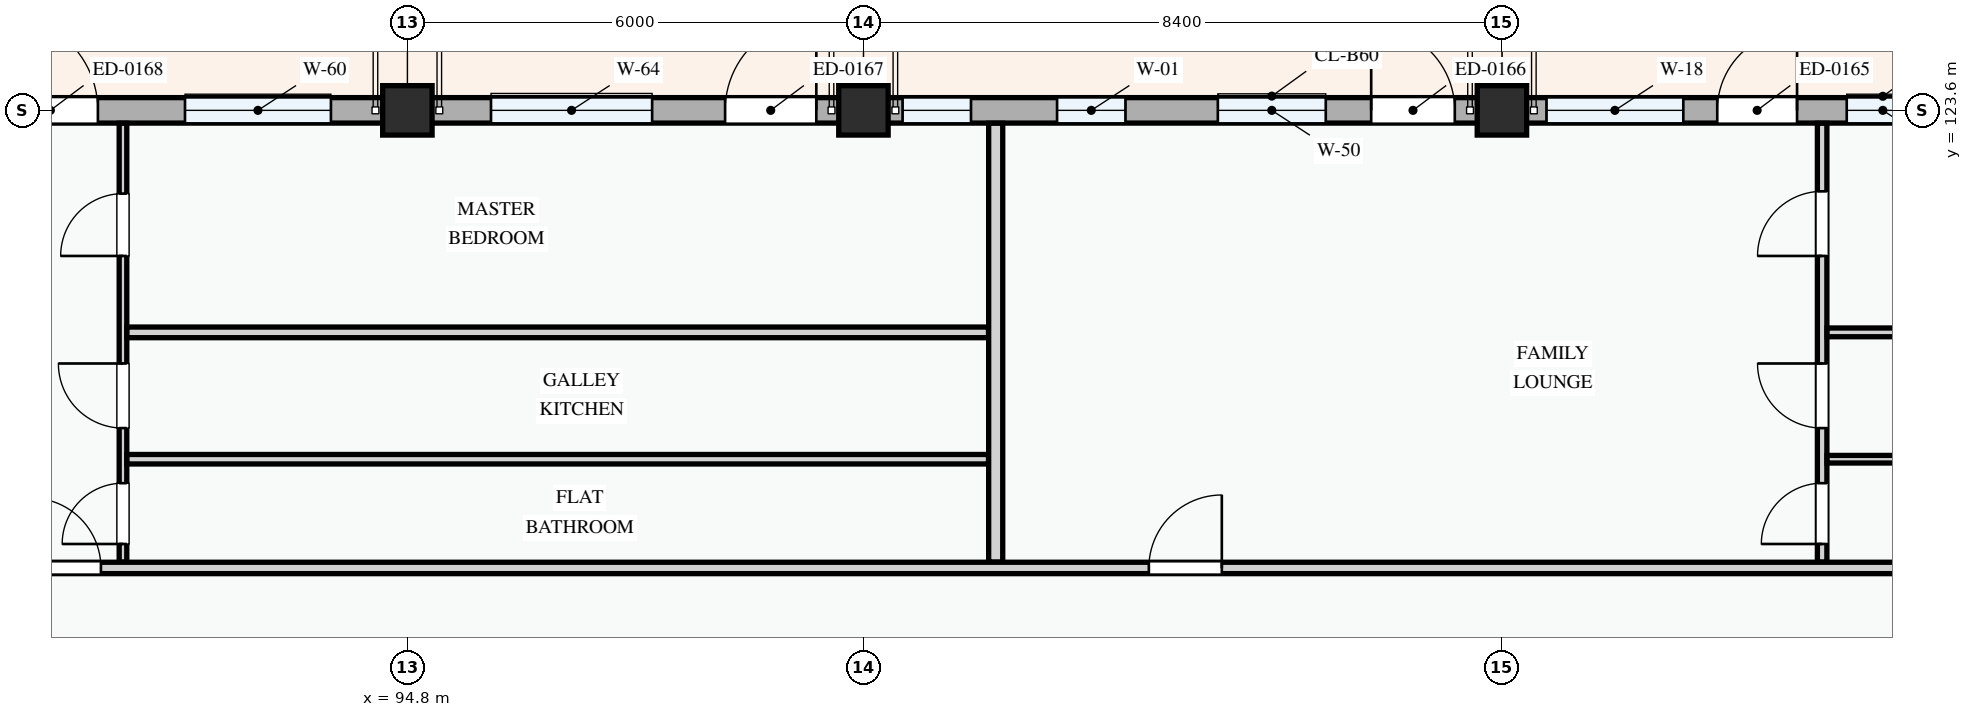
"""IFC4 building model, lengths in metres.
Left out: names, types, materials, properties, quantities, classifications, styles, units other than length and angle.
Written with IfcOpenShell. Run it as: python <this file> out.ifc"""

import sys

from ifc_helpers import new_model, si_unit, direction, frame, frame_2d, origin, origin_2d, place, context, subcontext, project, spatial, rectangle, extrude, element, fill, save


model = new_model("IFC4")
c1 = context("Model", 3, precision=1e-05, world=origin(), true_north=direction((0.0, 1.0)))
c2 = subcontext(c1, "Body", "Model", "MODEL_VIEW")
j1 = project(units=[si_unit("LENGTHUNIT", "METRE"), si_unit("PLANEANGLEUNIT", "RADIAN")], contexts=[c1])
p1 = place(None, origin())
s1 = spatial("IfcSite", under=j1, at=p1, CompositionType="ELEMENT")
p2 = place(p1, origin())
s2 = spatial("IfcBuilding", under=s1, at=p2, CompositionType="ELEMENT")
p3 = place(p2, frame((0.0, 0.0, 14.7)))
s3 = spatial("IfcBuildingStorey", under=s2, at=p3, CompositionType="ELEMENT", Elevation=14.7)
for number, where, z_axis, x_axis in (
    (1, (94.8, 123.6, 0.0), (0.0, 0.0, 1.0), (1.0, 0.0, 0.0)),
    (2, (100.8, 123.6, 0.0), (0.0, 0.0, 1.0), (1.0, 0.0, 0.0)),
    (3, (109.2, 123.6, 0.0), (0.0, 0.0, 1.0), (1.0, 0.0, 0.0)),
):
    element("IfcColumn", number, at=place(p3, frame(where, z_axis=z_axis, x_axis=x_axis)), inside=s3, PredefinedType="COLUMN", context=c2, shape_type="SweptSolid", body=[
        extrude(rectangle(XDim=0.65, YDim=0.65, at=origin_2d()), origin(), (0.0, 0.0, 1.0), 3.3),
    ])
p4 = place(p3, frame((115.2, 123.6, 0.0), z_axis=(0.0, 0.0, 1.0), x_axis=(-1.0, 0.0, 0.0)))
e4 = element("IfcWall", 4, at=p4, inside=s3, PredefinedType="STANDARD", context=c2, shape_type="SweptSolid", body=[
    extrude(rectangle(XDim=6.0, YDim=0.335, at=frame_2d((3.0, 0.0))), origin(), (0.0, 0.0, 1.0), 2.445),
])
p5 = place(p4, frame((2.117, 0.0, 0.0)))
e5 = element("IfcOpeningElement", 5, at=p5, cuts=e4, PredefinedType="OPENING", context=c2, shape_type="SweptSolid", body=[
    extrude(rectangle(XDim=1.05, YDim=2.15, at=frame_2d((0.525, 1.075))), frame((0.0, 0.177, 0.0), z_axis=(0.0, -1.0, 0.0), x_axis=(1.0, 0.0, 0.0)), (0.0, 0.0, 1.0), 0.355),
])
p6 = place(p4, frame((0.514, 0.0, 0.78)))
e6 = element("IfcOpeningElement", 6, at=p6, cuts=e4, PredefinedType="OPENING", context=c2, shape_type="SweptSolid", body=[
    extrude(rectangle(XDim=0.95, YDim=1.15, at=frame_2d((0.475, 0.575))), frame((0.0, 0.177, 0.0), z_axis=(0.0, -1.0, 0.0), x_axis=(1.0, 0.0, 0.0)), (0.0, 0.0, 1.0), 0.355),
])
p7 = place(p4, frame((3.614, 0.0, 0.78)))
e7 = element("IfcOpeningElement", 7, at=p7, cuts=e4, PredefinedType="OPENING", context=c2, shape_type="SweptSolid", body=[
    extrude(rectangle(XDim=1.8, YDim=1.5, at=frame_2d((0.9, 0.75))), frame((0.0, 0.177, 0.0), z_axis=(0.0, -1.0, 0.0), x_axis=(1.0, 0.0, 0.0)), (0.0, 0.0, 1.0), 0.355),
])
p8 = place(p3, frame((109.2, 123.6, 0.0), z_axis=(0.0, 0.0, 1.0), x_axis=(-1.0, 0.0, 0.0)))
e8 = element("IfcWall", 8, at=p8, inside=s3, PredefinedType="STANDARD", context=c2, shape_type="SweptSolid", body=[
    extrude(rectangle(XDim=8.4, YDim=0.335, at=frame_2d((4.2, 0.0))), origin(), (0.0, 0.0, 1.0), 2.345),
])
p9 = place(p8, frame((0.62, 0.0, 0.0)))
e9 = element("IfcOpeningElement", 9, at=p9, cuts=e8, PredefinedType="OPENING", context=c2, shape_type="SweptSolid", body=[
    extrude(rectangle(XDim=1.1, YDim=2.15, at=frame_2d((0.55, 1.075))), frame((0.0, 0.177, 0.0), z_axis=(0.0, -1.0, 0.0), x_axis=(1.0, 0.0, 0.0)), (0.0, 0.0, 1.0), 0.355),
])
p10 = place(p8, frame((2.317, 0.0, 0.78)))
e10 = element("IfcOpeningElement", 10, at=p10, cuts=e8, PredefinedType="OPENING", context=c2, shape_type="SweptSolid", body=[
    extrude(rectangle(XDim=1.42, YDim=1.38, at=frame_2d((0.71, 0.69))), frame((0.0, 0.177, 0.0), z_axis=(0.0, -1.0, 0.0), x_axis=(1.0, 0.0, 0.0)), (0.0, 0.0, 1.0), 0.355),
])
p11 = place(p8, frame((4.952, 0.0, 0.78)))
e11 = element("IfcOpeningElement", 11, at=p11, cuts=e8, PredefinedType="OPENING", context=c2, shape_type="SweptSolid", body=[
    extrude(rectangle(XDim=0.9, YDim=1.2, at=frame_2d((0.45, 0.6))), frame((0.0, 0.177, 0.0), z_axis=(0.0, -1.0, 0.0), x_axis=(1.0, 0.0, 0.0)), (0.0, 0.0, 1.0), 0.355),
])
p12 = place(p8, frame((6.985, 0.0, 0.78)))
e12 = element("IfcOpeningElement", 12, at=p12, cuts=e8, PredefinedType="OPENING", context=c2, shape_type="SweptSolid", body=[
    extrude(rectangle(XDim=0.9, YDim=1.2, at=frame_2d((0.45, 0.6))), frame((0.0, 0.177, 0.0), z_axis=(0.0, -1.0, 0.0), x_axis=(1.0, 0.0, 0.0)), (0.0, 0.0, 1.0), 0.355),
])
p13 = place(p3, frame((100.8, 123.6, 0.0), z_axis=(0.0, 0.0, 1.0), x_axis=(-1.0, 0.0, 0.0)))
e13 = element("IfcWall", 13, at=p13, inside=s3, PredefinedType="STANDARD", context=c2, shape_type="SweptSolid", body=[
    extrude(rectangle(XDim=6.0, YDim=0.335, at=frame_2d((3.0, 0.0))), origin(), (0.0, 0.0, 1.0), 2.445),
])
p14 = place(p13, frame((0.62, 0.0, 0.0)))
e14 = element("IfcOpeningElement", 14, at=p14, cuts=e13, PredefinedType="OPENING", context=c2, shape_type="SweptSolid", body=[
    extrude(rectangle(XDim=1.2, YDim=2.15, at=frame_2d((0.6, 1.075))), frame((0.0, 0.177, 0.0), z_axis=(0.0, -1.0, 0.0), x_axis=(1.0, 0.0, 0.0)), (0.0, 0.0, 1.0), 0.355),
])
p15 = place(p13, frame((2.78, 0.0, 0.78)))
e15 = element("IfcOpeningElement", 15, at=p15, cuts=e13, PredefinedType="OPENING", context=c2, shape_type="SweptSolid", body=[
    extrude(rectangle(XDim=2.12, YDim=1.44, at=frame_2d((1.06, 0.72))), frame((0.0, 0.177, 0.0), z_axis=(0.0, -1.0, 0.0), x_axis=(1.0, 0.0, 0.0)), (0.0, 0.0, 1.0), 0.355),
])
p16 = place(p3, frame((94.8, 123.6, 0.0), z_axis=(0.0, 0.0, 1.0), x_axis=(-1.0, 0.0, 0.0)))
e16 = element("IfcWall", 16, at=p16, inside=s3, PredefinedType="STANDARD", context=c2, shape_type="SweptSolid", body=[
    extrude(rectangle(XDim=8.4, YDim=0.335, at=frame_2d((4.2, 0.0))), origin(), (0.0, 0.0, 1.0), 2.345),
])
p17 = place(p16, frame((4.072, 0.0, 0.0)))
e17 = element("IfcOpeningElement", 17, at=p17, cuts=e16, PredefinedType="OPENING", context=c2, shape_type="SweptSolid", body=[
    extrude(rectangle(XDim=1.25, YDim=2.2, at=frame_2d((0.625, 1.1))), frame((0.0, 0.177, 0.0), z_axis=(0.0, -1.0, 0.0), x_axis=(1.0, 0.0, 0.0)), (0.0, 0.0, 1.0), 0.355),
])
p18 = place(p16, frame((1.006, 0.0, 0.78)))
e18 = element("IfcOpeningElement", 18, at=p18, cuts=e16, PredefinedType="OPENING", context=c2, shape_type="SweptSolid", body=[
    extrude(rectangle(XDim=1.92, YDim=1.44, at=frame_2d((0.96, 0.72))), frame((0.0, 0.177, 0.0), z_axis=(0.0, -1.0, 0.0), x_axis=(1.0, 0.0, 0.0)), (0.0, 0.0, 1.0), 0.355),
])
p19 = place(p16, frame((6.166, 0.0, 0.78)))
e19 = element("IfcOpeningElement", 19, at=p19, cuts=e16, PredefinedType="OPENING", context=c2, shape_type="SweptSolid", body=[
    extrude(rectangle(XDim=1.25, YDim=1.45, at=frame_2d((0.625, 0.725))), frame((0.0, 0.177, 0.0), z_axis=(0.0, -1.0, 0.0), x_axis=(1.0, 0.0, 0.0)), (0.0, 0.0, 1.0), 0.355),
])
p20 = place(p3, frame((91.058, 117.657, 0.0), z_axis=(0.0, 0.0, 1.0), x_axis=(0.0, 1.0, 0.0)))
e20 = element("IfcWall", 20, at=p20, inside=s3, PredefinedType="PARTITIONING", context=c2, shape_type="SweptSolid", body=[
    extrude(rectangle(XDim=5.773, YDim=0.1, at=frame_2d((2.887, 0.0))), origin(), (0.0, 0.0, 1.0), 3.0),
])
p21 = place(p20, frame((0.238, 0.0, 0.0)))
e21 = element("IfcOpeningElement", 21, at=p21, cuts=e20, PredefinedType="OPENING", context=c2, shape_type="SweptSolid", body=[
    extrude(rectangle(XDim=0.8, YDim=2.1, at=frame_2d((0.4, 1.05))), frame((0.0, 0.06, 0.0), z_axis=(0.0, -1.0, 0.0), x_axis=(1.0, 0.0, 0.0)), (0.0, 0.0, 1.0), 0.12),
])
p22 = place(p20, frame((1.763, 0.0, 0.0)))
e22 = element("IfcOpeningElement", 22, at=p22, cuts=e20, PredefinedType="OPENING", context=c2, shape_type="SweptSolid", body=[
    extrude(rectangle(XDim=0.85, YDim=2.1, at=frame_2d((0.425, 1.05))), frame((0.0, 0.06, 0.0), z_axis=(0.0, -1.0, 0.0), x_axis=(1.0, 0.0, 0.0)), (0.0, 0.0, 1.0), 0.12),
])
p23 = place(p20, frame((4.028, 0.0, 0.0)))
e23 = element("IfcOpeningElement", 23, at=p23, cuts=e20, PredefinedType="OPENING", context=c2, shape_type="SweptSolid", body=[
    extrude(rectangle(XDim=0.82, YDim=2.08, at=frame_2d((0.41, 1.04))), frame((0.0, 0.06, 0.0), z_axis=(0.0, -1.0, 0.0), x_axis=(1.0, 0.0, 0.0)), (0.0, 0.0, 1.0), 0.12),
])
p24 = place(p3, frame((91.11, 120.679, 0.0), z_axis=(0.0, 0.0, 1.0), x_axis=(1.0, 0.0, 0.0)))
e24 = element("IfcWall", 24, at=p24, inside=s3, PredefinedType="PARTITIONING", context=c2, shape_type="SweptSolid", body=[
    extrude(rectangle(XDim=11.335, YDim=0.14, at=frame_2d((5.667, 0.0))), origin(), (0.0, 0.0, 1.0), 3.0),
])
p25 = place(p3, frame((91.11, 119.01, 0.0), z_axis=(0.0, 0.0, 1.0), x_axis=(1.0, 0.0, 0.0)))
e25 = element("IfcWall", 25, at=p25, inside=s3, PredefinedType="PARTITIONING", context=c2, shape_type="SweptSolid", body=[
    extrude(rectangle(XDim=11.335, YDim=0.125, at=frame_2d((5.667, 0.0))), origin(), (0.0, 0.0, 1.0), 3.0),
])
p26 = place(p3, frame((113.413, 117.657, 0.0), z_axis=(0.0, 0.0, 1.0), x_axis=(0.0, 1.0, 0.0)))
e26 = element("IfcWall", 26, at=p26, inside=s3, PredefinedType="PARTITIONING", context=c2, shape_type="SweptSolid", body=[
    extrude(rectangle(XDim=5.773, YDim=0.125, at=frame_2d((2.887, 0.0))), origin(), (0.0, 0.0, 1.0), 3.0),
])
p27 = place(p26, frame((0.238, 0.0, 0.0)))
e27 = element("IfcOpeningElement", 27, at=p27, cuts=e26, PredefinedType="OPENING", context=c2, shape_type="SweptSolid", body=[
    extrude(rectangle(XDim=0.8, YDim=2.1, at=frame_2d((0.4, 1.05))), frame((0.0, 0.073, 0.0), z_axis=(0.0, -1.0, 0.0), x_axis=(1.0, 0.0, 0.0)), (0.0, 0.0, 1.0), 0.145),
])
p28 = place(p26, frame((1.763, 0.0, 0.0)))
e28 = element("IfcOpeningElement", 28, at=p28, cuts=e26, PredefinedType="OPENING", context=c2, shape_type="SweptSolid", body=[
    extrude(rectangle(XDim=0.85, YDim=2.1, at=frame_2d((0.425, 1.05))), frame((0.0, 0.073, 0.0), z_axis=(0.0, -1.0, 0.0), x_axis=(1.0, 0.0, 0.0)), (0.0, 0.0, 1.0), 0.145),
])
p29 = place(p26, frame((4.028, 0.0, 0.0)))
e29 = element("IfcOpeningElement", 29, at=p29, cuts=e26, PredefinedType="OPENING", context=c2, shape_type="SweptSolid", body=[
    extrude(rectangle(XDim=0.85, YDim=2.1, at=frame_2d((0.425, 1.05))), frame((0.0, 0.073, 0.0), z_axis=(0.0, -1.0, 0.0), x_axis=(1.0, 0.0, 0.0)), (0.0, 0.0, 1.0), 0.145),
])
p30 = place(p3, frame((113.477, 120.679, 0.0), z_axis=(0.0, 0.0, 1.0), x_axis=(1.0, 0.0, 0.0)))
e30 = element("IfcWall", 30, at=p30, inside=s3, PredefinedType="PARTITIONING", context=c2, shape_type="SweptSolid", body=[
    extrude(rectangle(XDim=11.811, YDim=0.115, at=frame_2d((5.905, 0.0))), origin(), (0.0, 0.0, 1.0), 3.0),
])
p31 = place(p3, frame((113.477, 119.01, 0.0), z_axis=(0.0, 0.0, 1.0), x_axis=(1.0, 0.0, 0.0)))
e31 = element("IfcWall", 31, at=p31, inside=s3, PredefinedType="PARTITIONING", context=c2, shape_type="SweptSolid", body=[
    extrude(rectangle(XDim=11.811, YDim=0.1, at=frame_2d((5.905, 0.0))), origin(), (0.0, 0.0, 1.0), 3.0),
])
p32 = place(p3, frame((102.54, 117.657, 0.0), z_axis=(0.0, 0.0, 1.0), x_axis=(0.0, 1.0, 0.0)))
e32 = element("IfcWall", 32, at=p32, inside=s3, PredefinedType="PARTITIONING", context=c2, shape_type="SweptSolid", body=[
    extrude(rectangle(XDim=5.773, YDim=0.185, at=frame_2d((2.887, 0.0))), origin(), (0.0, 0.0, 1.0), 3.0),
])
p33 = place(p3, frame((80.57, 117.58, 0.0), z_axis=(0.0, 0.0, 1.0), x_axis=(1.0, 0.0, 0.0)))
e33 = element("IfcWall", 33, at=p33, inside=s3, PredefinedType="PARTITIONING", context=c2, shape_type="SweptSolid", body=[
    extrude(rectangle(XDim=71.97, YDim=0.15, at=frame_2d((35.985, 0.0))), origin(), (0.0, 0.0, 1.0), 3.0),
])
p34 = place(p33, frame((9.279, 0.0, 0.0)))
e34 = element("IfcOpeningElement", 34, at=p34, cuts=e33, PredefinedType="OPENING", context=c2, shape_type="SweptSolid", body=[
    extrude(rectangle(XDim=0.92, YDim=2.1, at=frame_2d((0.46, 1.05))), frame((0.0, 0.085, 0.0), z_axis=(0.0, -1.0, 0.0), x_axis=(1.0, 0.0, 0.0)), (0.0, 0.0, 1.0), 0.17),
])
p35 = place(p33, frame((23.985, 0.0, 0.0)))
e35 = element("IfcOpeningElement", 35, at=p35, cuts=e33, PredefinedType="OPENING", context=c2, shape_type="SweptSolid", body=[
    extrude(rectangle(XDim=0.96, YDim=2.12, at=frame_2d((0.48, 1.06))), frame((0.0, 0.085, 0.0), z_axis=(0.0, -1.0, 0.0), x_axis=(1.0, 0.0, 0.0)), (0.0, 0.0, 1.0), 0.17),
])
p36 = place(p33, frame((52.695, 0.0, 0.0)))
e36 = element("IfcOpeningElement", 36, at=p36, cuts=e33, PredefinedType="OPENING", context=c2, shape_type="SweptSolid", body=[
    extrude(rectangle(XDim=0.92, YDim=2.1, at=frame_2d((0.46, 1.05))), frame((0.0, 0.085, 0.0), z_axis=(0.0, -1.0, 0.0), x_axis=(1.0, 0.0, 0.0)), (0.0, 0.0, 1.0), 0.17),
])
p37 = place(p5, frame((1.05, 0.0, 0.0), z_axis=(0.0, 0.0, 1.0), x_axis=(-1.0, 0.0, 0.0)))
e37 = element("IfcDoor", 37, at=p37, inside=s3, OperationType="SINGLE_SWING_RIGHT", PredefinedType="DOOR", context=c2, shape_type="SweptSolid", body=[
    extrude(rectangle(XDim=1.05, YDim=2.15, at=frame_2d((0.525, 1.075))), frame((0.0, 0.025, 0.0), z_axis=(0.0, -1.0, 0.0), x_axis=(1.0, 0.0, 0.0)), (0.0, 0.0, 1.0), 0.05),
])
fill(e5, e37)
p38 = place(p6, origin())
e38 = element("IfcWindow", 38, at=p38, inside=s3, PartitioningType="SINGLE_PANEL", PredefinedType="WINDOW", context=c2, shape_type="SweptSolid", body=[
    extrude(rectangle(XDim=0.95, YDim=1.15, at=frame_2d((0.475, 0.575))), frame((0.0, 0.03, 0.0), z_axis=(0.0, -1.0, 0.0), x_axis=(1.0, 0.0, 0.0)), (0.0, 0.0, 1.0), 0.06),
])
fill(e6, e38)
p39 = place(p7, origin())
e39 = element("IfcWindow", 39, at=p39, inside=s3, PartitioningType="DOUBLE_PANEL_VERTICAL", PredefinedType="WINDOW", context=c2, shape_type="SweptSolid", body=[
    extrude(rectangle(XDim=1.8, YDim=1.5, at=frame_2d((0.9, 0.75))), frame((0.0, 0.03, 0.0), z_axis=(0.0, -1.0, 0.0), x_axis=(1.0, 0.0, 0.0)), (0.0, 0.0, 1.0), 0.06),
])
fill(e7, e39)
p40 = place(p9, frame((1.1, 0.0, 0.0), z_axis=(0.0, 0.0, 1.0), x_axis=(-1.0, 0.0, 0.0)))
e40 = element("IfcDoor", 40, at=p40, inside=s3, OperationType="SINGLE_SWING_LEFT", PredefinedType="DOOR", context=c2, shape_type="SweptSolid", body=[
    extrude(rectangle(XDim=1.1, YDim=2.15, at=frame_2d((0.55, 1.075))), frame((0.0, 0.025, 0.0), z_axis=(0.0, -1.0, 0.0), x_axis=(1.0, 0.0, 0.0)), (0.0, 0.0, 1.0), 0.05),
])
fill(e9, e40)
p41 = place(p10, origin())
e41 = element("IfcWindow", 41, at=p41, inside=s3, PartitioningType="SINGLE_PANEL", PredefinedType="WINDOW", context=c2, shape_type="SweptSolid", body=[
    extrude(rectangle(XDim=1.42, YDim=1.38, at=frame_2d((0.71, 0.69))), frame((0.0, 0.03, 0.0), z_axis=(0.0, -1.0, 0.0), x_axis=(1.0, 0.0, 0.0)), (0.0, 0.0, 1.0), 0.06),
])
fill(e10, e41)
p42 = place(p11, origin())
e42 = element("IfcWindow", 42, at=p42, inside=s3, PartitioningType="SINGLE_PANEL", PredefinedType="WINDOW", context=c2, shape_type="SweptSolid", body=[
    extrude(rectangle(XDim=0.9, YDim=1.2, at=frame_2d((0.45, 0.6))), frame((0.0, 0.03, 0.0), z_axis=(0.0, -1.0, 0.0), x_axis=(1.0, 0.0, 0.0)), (0.0, 0.0, 1.0), 0.06),
])
fill(e11, e42)
p43 = place(p12, origin())
e43 = element("IfcWindow", 43, at=p43, inside=s3, PartitioningType="SINGLE_PANEL", PredefinedType="WINDOW", context=c2, shape_type="SweptSolid", body=[
    extrude(rectangle(XDim=0.9, YDim=1.2, at=frame_2d((0.45, 0.6))), frame((0.0, 0.03, 0.0), z_axis=(0.0, -1.0, 0.0), x_axis=(1.0, 0.0, 0.0)), (0.0, 0.0, 1.0), 0.06),
])
fill(e12, e43)
p44 = place(p14, frame((1.2, 0.0, 0.0), z_axis=(0.0, 0.0, 1.0), x_axis=(-1.0, 0.0, 0.0)))
e44 = element("IfcDoor", 44, at=p44, inside=s3, OperationType="SINGLE_SWING_RIGHT", PredefinedType="DOOR", context=c2, shape_type="SweptSolid", body=[
    extrude(rectangle(XDim=1.2, YDim=2.15, at=frame_2d((0.6, 1.075))), frame((0.0, 0.025, 0.0), z_axis=(0.0, -1.0, 0.0), x_axis=(1.0, 0.0, 0.0)), (0.0, 0.0, 1.0), 0.05),
])
fill(e14, e44)
p45 = place(p15, origin())
e45 = element("IfcWindow", 45, at=p45, inside=s3, PartitioningType="DOUBLE_PANEL_VERTICAL", PredefinedType="WINDOW", context=c2, shape_type="SweptSolid", body=[
    extrude(rectangle(XDim=2.12, YDim=1.44, at=frame_2d((1.06, 0.72))), frame((0.0, 0.03, 0.0), z_axis=(0.0, -1.0, 0.0), x_axis=(1.0, 0.0, 0.0)), (0.0, 0.0, 1.0), 0.06),
])
fill(e15, e45)
p46 = place(p17, frame((1.25, 0.0, 0.0), z_axis=(0.0, 0.0, 1.0), x_axis=(-1.0, 0.0, 0.0)))
e46 = element("IfcDoor", 46, at=p46, inside=s3, OperationType="SINGLE_SWING_LEFT", PredefinedType="DOOR", context=c2, shape_type="SweptSolid", body=[
    extrude(rectangle(XDim=1.25, YDim=2.2, at=frame_2d((0.625, 1.1))), frame((0.0, 0.025, 0.0), z_axis=(0.0, -1.0, 0.0), x_axis=(1.0, 0.0, 0.0)), (0.0, 0.0, 1.0), 0.05),
])
fill(e17, e46)
p47 = place(p18, origin())
e47 = element("IfcWindow", 47, at=p47, inside=s3, PartitioningType="DOUBLE_PANEL_VERTICAL", PredefinedType="WINDOW", context=c2, shape_type="SweptSolid", body=[
    extrude(rectangle(XDim=1.92, YDim=1.44, at=frame_2d((0.96, 0.72))), frame((0.0, 0.03, 0.0), z_axis=(0.0, -1.0, 0.0), x_axis=(1.0, 0.0, 0.0)), (0.0, 0.0, 1.0), 0.06),
])
fill(e18, e47)
p48 = place(p21, origin())
e48 = element("IfcDoor", 48, at=p48, inside=s3, OperationType="SINGLE_SWING_LEFT", PredefinedType="DOOR", context=c2, shape_type="SweptSolid", body=[
    extrude(rectangle(XDim=0.8, YDim=2.1, at=frame_2d((0.4, 1.05))), frame((0.0, 0.025, 0.0), z_axis=(0.0, -1.0, 0.0), x_axis=(1.0, 0.0, 0.0)), (0.0, 0.0, 1.0), 0.05),
])
fill(e21, e48)
p49 = place(p22, origin())
e49 = element("IfcDoor", 49, at=p49, inside=s3, OperationType="SINGLE_SWING_RIGHT", PredefinedType="DOOR", context=c2, shape_type="SweptSolid", body=[
    extrude(rectangle(XDim=0.85, YDim=2.1, at=frame_2d((0.425, 1.05))), frame((0.0, 0.025, 0.0), z_axis=(0.0, -1.0, 0.0), x_axis=(1.0, 0.0, 0.0)), (0.0, 0.0, 1.0), 0.05),
])
fill(e22, e49)
p50 = place(p23, origin())
e50 = element("IfcDoor", 50, at=p50, inside=s3, OperationType="SINGLE_SWING_LEFT", PredefinedType="DOOR", context=c2, shape_type="SweptSolid", body=[
    extrude(rectangle(XDim=0.82, YDim=2.08, at=frame_2d((0.41, 1.04))), frame((0.0, 0.025, 0.0), z_axis=(0.0, -1.0, 0.0), x_axis=(1.0, 0.0, 0.0)), (0.0, 0.0, 1.0), 0.05),
])
fill(e23, e50)
p51 = place(p27, origin())
e51 = element("IfcDoor", 51, at=p51, inside=s3, OperationType="SINGLE_SWING_LEFT", PredefinedType="DOOR", context=c2, shape_type="SweptSolid", body=[
    extrude(rectangle(XDim=0.8, YDim=2.1, at=frame_2d((0.4, 1.05))), frame((0.0, 0.025, 0.0), z_axis=(0.0, -1.0, 0.0), x_axis=(1.0, 0.0, 0.0)), (0.0, 0.0, 1.0), 0.05),
])
fill(e27, e51)
p52 = place(p28, origin())
e52 = element("IfcDoor", 52, at=p52, inside=s3, OperationType="SINGLE_SWING_RIGHT", PredefinedType="DOOR", context=c2, shape_type="SweptSolid", body=[
    extrude(rectangle(XDim=0.85, YDim=2.1, at=frame_2d((0.425, 1.05))), frame((0.0, 0.025, 0.0), z_axis=(0.0, -1.0, 0.0), x_axis=(1.0, 0.0, 0.0)), (0.0, 0.0, 1.0), 0.05),
])
fill(e28, e52)
p53 = place(p29, origin())
e53 = element("IfcDoor", 53, at=p53, inside=s3, OperationType="SINGLE_SWING_LEFT", PredefinedType="DOOR", context=c2, shape_type="SweptSolid", body=[
    extrude(rectangle(XDim=0.85, YDim=2.1, at=frame_2d((0.425, 1.05))), frame((0.0, 0.025, 0.0), z_axis=(0.0, -1.0, 0.0), x_axis=(1.0, 0.0, 0.0)), (0.0, 0.0, 1.0), 0.05),
])
fill(e29, e53)
p54 = place(p34, origin())
e54 = element("IfcDoor", 54, at=p54, inside=s3, OperationType="SINGLE_SWING_LEFT", PredefinedType="DOOR", context=c2, shape_type="SweptSolid", body=[
    extrude(rectangle(XDim=0.92, YDim=2.1, at=frame_2d((0.46, 1.05))), frame((0.0, 0.025, 0.0), z_axis=(0.0, -1.0, 0.0), x_axis=(1.0, 0.0, 0.0)), (0.0, 0.0, 1.0), 0.05),
])
fill(e34, e54)
p55 = place(p35, origin())
e55 = element("IfcDoor", 55, at=p55, inside=s3, OperationType="SINGLE_SWING_RIGHT", PredefinedType="DOOR", context=c2, shape_type="SweptSolid", body=[
    extrude(rectangle(XDim=0.96, YDim=2.12, at=frame_2d((0.48, 1.06))), frame((0.0, 0.025, 0.0), z_axis=(0.0, -1.0, 0.0), x_axis=(1.0, 0.0, 0.0)), (0.0, 0.0, 1.0), 0.05),
])
fill(e35, e55)
save(model, sys.argv[1])
